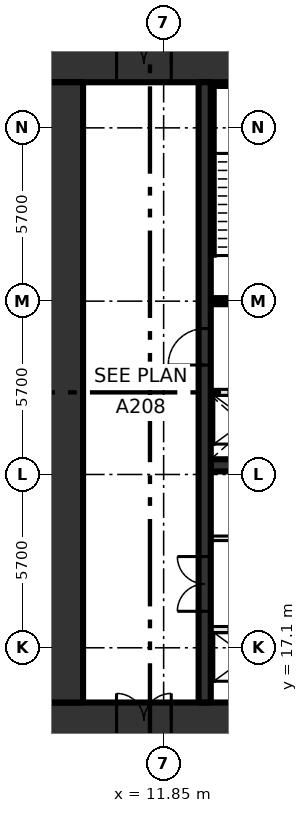
"""IFC4 building model, lengths in metres.
Left out: names, types, materials, properties, quantities, classifications, styles, units other than length and angle.
Written with IfcOpenShell. Run it as: python <this file> out.ifc"""

import sys

from ifc_helpers import new_model, si_unit, direction, frame, frame_2d, origin, place, context, subcontext, project, spatial, rectangle, extrude, element, fill, save


model = new_model("IFC4")
c1 = context("Model", 3, precision=1e-05, world=origin(), true_north=direction((0.0, 1.0)))
c2 = subcontext(c1, "Body", "Model", "MODEL_VIEW")
j1 = project(units=[si_unit("LENGTHUNIT", "METRE"), si_unit("PLANEANGLEUNIT", "RADIAN")], contexts=[c1])
p1 = place(None, origin())
s1 = spatial("IfcSite", under=j1, at=p1, CompositionType="ELEMENT")
p2 = place(p1, origin())
s2 = spatial("IfcBuilding", under=s1, at=p2, CompositionType="ELEMENT")
p3 = place(p2, frame((0.0, 0.0, 28.2)))
s3 = spatial("IfcBuildingStorey", under=s2, at=p3, CompositionType="ELEMENT", Elevation=28.2)
p4 = place(p3, frame((8.0, 14.7, -0.45), z_axis=(0.0, 0.0, 1.0), x_axis=(1.0, 0.0, 0.0)))
e1 = element("IfcWall", 1, at=p4, inside=s3, PredefinedType="SHEAR", context=c2, shape_type="SweptSolid", body=[
    extrude(rectangle(XDim=22.8, YDim=1.2, at=frame_2d((11.4, 0.0))), origin(), (0.0, 0.0, 1.0), 4.8),
])
p5 = place(p4, frame((2.3, 0.0, 0.45)))
e2 = element("IfcOpeningElement", 2, at=p5, cuts=e1, PredefinedType="OPENING", context=c2, shape_type="SweptSolid", body=[
    extrude(rectangle(XDim=1.8, YDim=2.1, at=frame_2d((0.9, 1.05))), frame((0.0, 0.61, 0.0), z_axis=(0.0, -1.0, 0.0), x_axis=(1.0, 0.0, 0.0)), (0.0, 0.0, 1.0), 1.22),
])
p6 = place(p3, frame((8.0, 36.3, -0.45), z_axis=(0.0, 0.0, 1.0), x_axis=(1.0, 0.0, 0.0)))
e3 = element("IfcWall", 3, at=p6, inside=s3, PredefinedType="SHEAR", context=c2, shape_type="SweptSolid", body=[
    extrude(rectangle(XDim=22.8, YDim=1.2, at=frame_2d((11.4, 0.0))), origin(), (0.0, 0.0, 1.0), 4.8),
])
p7 = place(p6, frame((2.3, 0.0, 0.45)))
e4 = element("IfcOpeningElement", 4, at=p7, cuts=e3, PredefinedType="OPENING", context=c2, shape_type="SweptSolid", body=[
    extrude(rectangle(XDim=1.8, YDim=2.1, at=frame_2d((0.9, 1.05))), frame((0.0, 0.61, 0.0), z_axis=(0.0, -1.0, 0.0), x_axis=(1.0, 0.0, 0.0)), (0.0, 0.0, 1.0), 1.22),
])
p8 = place(p3, frame((8.6, 15.3, -0.45), z_axis=(0.0, 0.0, 1.0), x_axis=(0.0, 1.0, 0.0)))
e5 = element("IfcWall", 5, at=p8, inside=s3, PredefinedType="SHEAR", context=c2, shape_type="SweptSolid", body=[
    extrude(rectangle(XDim=20.4, YDim=1.2, at=frame_2d((10.2, 0.0))), origin(), (0.0, 0.0, 1.0), 4.8),
])
p9 = place(p3, frame((13.4, 17.7, 0.0), z_axis=(0.0, 0.0, 1.0), x_axis=(1.0, 0.0, 0.0)))
e6 = element("IfcWall", 6, at=p9, inside=s3, PredefinedType="SOLIDWALL", context=c2, shape_type="SweptSolid", body=[
    extrude(rectangle(XDim=13.4, YDim=0.2, at=frame_2d((6.7, 0.0))), origin(), (0.0, 0.0, 1.0), 4.35),
])
p10 = place(p9, frame((0.6, 0.0, 0.0)))
e7 = element("IfcOpeningElement", 7, at=p10, cuts=e6, PredefinedType="OPENING", context=c2, shape_type="SweptSolid", body=[
    extrude(rectangle(XDim=1.1, YDim=2.1, at=frame_2d((0.55, 1.05))), frame((0.0, 0.11, 0.0), z_axis=(0.0, -1.0, 0.0), x_axis=(1.0, 0.0, 0.0)), (0.0, 0.0, 1.0), 0.22),
])
p11 = place(p9, frame((3.3, 0.0, 0.0)))
e8 = element("IfcOpeningElement", 8, at=p11, cuts=e6, PredefinedType="OPENING", context=c2, shape_type="SweptSolid", body=[
    extrude(rectangle(XDim=1.1, YDim=2.1, at=frame_2d((0.55, 1.05))), frame((0.0, 0.11, 0.0), z_axis=(0.0, -1.0, 0.0), x_axis=(1.0, 0.0, 0.0)), (0.0, 0.0, 1.0), 0.22),
])
p12 = place(p9, frame((6.0, 0.0, 0.0)))
e9 = element("IfcOpeningElement", 9, at=p12, cuts=e6, PredefinedType="OPENING", context=c2, shape_type="SweptSolid", body=[
    extrude(rectangle(XDim=1.1, YDim=2.1, at=frame_2d((0.55, 1.05))), frame((0.0, 0.11, 0.0), z_axis=(0.0, -1.0, 0.0), x_axis=(1.0, 0.0, 0.0)), (0.0, 0.0, 1.0), 0.22),
])
p13 = place(p9, frame((8.7, 0.0, 0.0)))
e10 = element("IfcOpeningElement", 10, at=p13, cuts=e6, PredefinedType="OPENING", context=c2, shape_type="SweptSolid", body=[
    extrude(rectangle(XDim=1.1, YDim=2.1, at=frame_2d((0.55, 1.05))), frame((0.0, 0.11, 0.0), z_axis=(0.0, -1.0, 0.0), x_axis=(1.0, 0.0, 0.0)), (0.0, 0.0, 1.0), 0.22),
])
p14 = place(p9, frame((11.4, 0.0, 0.0)))
e11 = element("IfcOpeningElement", 11, at=p14, cuts=e6, PredefinedType="OPENING", context=c2, shape_type="SweptSolid", body=[
    extrude(rectangle(XDim=1.1, YDim=2.1, at=frame_2d((0.55, 1.05))), frame((0.0, 0.11, 0.0), z_axis=(0.0, -1.0, 0.0), x_axis=(1.0, 0.0, 0.0)), (0.0, 0.0, 1.0), 0.22),
])
p15 = place(p3, frame((13.4, 20.7, 0.0), z_axis=(0.0, 0.0, 1.0), x_axis=(1.0, 0.0, 0.0)))
e12 = element("IfcWall", 12, at=p15, inside=s3, PredefinedType="PARTITIONING", context=c2, shape_type="SweptSolid", body=[
    extrude(rectangle(XDim=13.4, YDim=0.15, at=frame_2d((6.7, 0.0))), origin(), (0.0, 0.0, 1.0), 4.35),
])
p16 = place(p15, frame((4.75, 0.0, 0.0)))
e13 = element("IfcOpeningElement", 13, at=p16, cuts=e12, PredefinedType="OPENING", context=c2, shape_type="SweptSolid", body=[
    extrude(rectangle(XDim=0.9, YDim=2.1, at=frame_2d((0.45, 1.05))), frame((0.0, 0.085, 0.0), z_axis=(0.0, -1.0, 0.0), x_axis=(1.0, 0.0, 0.0)), (0.0, 0.0, 1.0), 0.17),
])
p17 = place(p15, frame((11.5, 0.0, 0.0)))
e14 = element("IfcOpeningElement", 14, at=p17, cuts=e12, PredefinedType="OPENING", context=c2, shape_type="SweptSolid", body=[
    extrude(rectangle(XDim=0.9, YDim=2.1, at=frame_2d((0.45, 1.05))), frame((0.0, 0.085, 0.0), z_axis=(0.0, -1.0, 0.0), x_axis=(1.0, 0.0, 0.0)), (0.0, 0.0, 1.0), 0.17),
])
p18 = place(p3, frame((13.4, 23.1, 0.0), z_axis=(0.0, 0.0, 1.0), x_axis=(1.0, 0.0, 0.0)))
e15 = element("IfcWall", 15, at=p18, inside=s3, PredefinedType="SHEAR", context=c2, shape_type="SweptSolid", body=[
    extrude(rectangle(XDim=16.2, YDim=0.4, at=frame_2d((8.1, 0.0))), origin(), (0.0, 0.0, 1.0), 4.35),
])
p19 = place(p3, frame((13.4, 25.5, 0.0), z_axis=(0.0, 0.0, 1.0), x_axis=(1.0, 0.0, 0.0)))
e16 = element("IfcWall", 16, at=p19, inside=s3, PredefinedType="SOLIDWALL", context=c2, shape_type="SweptSolid", body=[
    extrude(rectangle(XDim=16.2, YDim=0.2, at=frame_2d((8.1, 0.0))), origin(), (0.0, 0.0, 1.0), 4.35),
])
p20 = place(p19, frame((0.6, 0.0, 0.0)))
e17 = element("IfcOpeningElement", 17, at=p20, cuts=e16, PredefinedType="OPENING", context=c2, shape_type="SweptSolid", body=[
    extrude(rectangle(XDim=1.1, YDim=2.1, at=frame_2d((0.55, 1.05))), frame((0.0, 0.11, 0.0), z_axis=(0.0, -1.0, 0.0), x_axis=(1.0, 0.0, 0.0)), (0.0, 0.0, 1.0), 0.22),
])
p21 = place(p19, frame((3.3, 0.0, 0.0)))
e18 = element("IfcOpeningElement", 18, at=p21, cuts=e16, PredefinedType="OPENING", context=c2, shape_type="SweptSolid", body=[
    extrude(rectangle(XDim=1.1, YDim=2.1, at=frame_2d((0.55, 1.05))), frame((0.0, 0.11, 0.0), z_axis=(0.0, -1.0, 0.0), x_axis=(1.0, 0.0, 0.0)), (0.0, 0.0, 1.0), 0.22),
])
p22 = place(p19, frame((6.0, 0.0, 0.0)))
e19 = element("IfcOpeningElement", 19, at=p22, cuts=e16, PredefinedType="OPENING", context=c2, shape_type="SweptSolid", body=[
    extrude(rectangle(XDim=1.1, YDim=2.1, at=frame_2d((0.55, 1.05))), frame((0.0, 0.11, 0.0), z_axis=(0.0, -1.0, 0.0), x_axis=(1.0, 0.0, 0.0)), (0.0, 0.0, 1.0), 0.22),
])
p23 = place(p19, frame((8.7, 0.0, 0.0)))
e20 = element("IfcOpeningElement", 20, at=p23, cuts=e16, PredefinedType="OPENING", context=c2, shape_type="SweptSolid", body=[
    extrude(rectangle(XDim=1.1, YDim=2.1, at=frame_2d((0.55, 1.05))), frame((0.0, 0.11, 0.0), z_axis=(0.0, -1.0, 0.0), x_axis=(1.0, 0.0, 0.0)), (0.0, 0.0, 1.0), 0.22),
])
p24 = place(p3, frame((13.4, 28.5, 0.0), z_axis=(0.0, 0.0, 1.0), x_axis=(1.0, 0.0, 0.0)))
e21 = element("IfcWall", 21, at=p24, inside=s3, PredefinedType="SOLIDWALL", context=c2, shape_type="SweptSolid", body=[
    extrude(rectangle(XDim=6.7, YDim=0.2, at=frame_2d((3.35, 0.0))), origin(), (0.0, 0.0, 1.0), 4.35),
])
p25 = place(p24, frame((0.9, 0.0, 0.0)))
e22 = element("IfcOpeningElement", 22, at=p25, cuts=e21, PredefinedType="OPENING", context=c2, shape_type="SweptSolid", body=[
    extrude(rectangle(XDim=1.2, YDim=2.1, at=frame_2d((0.6, 1.05))), frame((0.0, 0.11, 0.0), z_axis=(0.0, -1.0, 0.0), x_axis=(1.0, 0.0, 0.0)), (0.0, 0.0, 1.0), 0.22),
])
p26 = place(p24, frame((3.7, 0.0, 0.0)))
e23 = element("IfcOpeningElement", 23, at=p26, cuts=e21, PredefinedType="OPENING", context=c2, shape_type="SweptSolid", body=[
    extrude(rectangle(XDim=1.1, YDim=2.1, at=frame_2d((0.55, 1.05))), frame((0.0, 0.11, 0.0), z_axis=(0.0, -1.0, 0.0), x_axis=(1.0, 0.0, 0.0)), (0.0, 0.0, 1.0), 0.22),
])
p27 = place(p3, frame((13.2, 15.3, 0.0), z_axis=(0.0, 0.0, 1.0), x_axis=(0.0, 1.0, 0.0)))
e24 = element("IfcWall", 24, at=p27, inside=s3, PredefinedType="SHEAR", context=c2, shape_type="SweptSolid", body=[
    extrude(rectangle(XDim=20.4, YDim=0.4, at=frame_2d((10.2, 0.0))), origin(), (0.0, 0.0, 1.0), 4.35),
])
p28 = place(p27, frame((3.0, 0.0, 0.0)))
e25 = element("IfcOpeningElement", 25, at=p28, cuts=e24, PredefinedType="OPENING", context=c2, shape_type="SweptSolid", body=[
    extrude(rectangle(XDim=1.8, YDim=2.1, at=frame_2d((0.9, 1.05))), frame((0.0, 0.21, 0.0), z_axis=(0.0, -1.0, 0.0), x_axis=(1.0, 0.0, 0.0)), (0.0, 0.0, 1.0), 0.42),
])
p29 = place(p27, frame((11.1, 0.0, 0.0)))
e26 = element("IfcOpeningElement", 26, at=p29, cuts=e24, PredefinedType="OPENING", context=c2, shape_type="SweptSolid", body=[
    extrude(rectangle(XDim=1.2, YDim=2.1, at=frame_2d((0.6, 1.05))), frame((0.0, 0.21, 0.0), z_axis=(0.0, -1.0, 0.0), x_axis=(1.0, 0.0, 0.0)), (0.0, 0.0, 1.0), 0.42),
])
p30 = place(p28, origin())
e27 = element("IfcDoor", 27, at=p30, inside=s3, OperationType="DOUBLE_DOOR_SINGLE_SWING", PredefinedType="DOOR", context=c2, shape_type="SweptSolid", body=[
    extrude(rectangle(XDim=1.8, YDim=2.1, at=frame_2d((0.9, 1.05))), frame((0.0, 0.025, 0.0), z_axis=(0.0, -1.0, 0.0), x_axis=(1.0, 0.0, 0.0)), (0.0, 0.0, 1.0), 0.05),
])
fill(e25, e27)
p31 = place(p29, origin())
e28 = element("IfcDoor", 28, at=p31, inside=s3, OperationType="SINGLE_SWING_LEFT", PredefinedType="DOOR", context=c2, shape_type="SweptSolid", body=[
    extrude(rectangle(XDim=1.2, YDim=2.1, at=frame_2d((0.6, 1.05))), frame((0.0, 0.025, 0.0), z_axis=(0.0, -1.0, 0.0), x_axis=(1.0, 0.0, 0.0)), (0.0, 0.0, 1.0), 0.05),
])
fill(e26, e28)
p32 = place(p7, origin())
e29 = element("IfcDoor", 29, at=p32, inside=s3, OperationType="DOUBLE_DOOR_SINGLE_SWING", PredefinedType="DOOR", context=c2, shape_type="SweptSolid", body=[
    extrude(rectangle(XDim=1.8, YDim=2.1, at=frame_2d((0.9, 1.05))), frame((0.0, 0.025, 0.0), z_axis=(0.0, -1.0, 0.0), x_axis=(1.0, 0.0, 0.0)), (0.0, 0.0, 1.0), 0.05),
])
fill(e4, e29)
p33 = place(p5, origin())
e30 = element("IfcDoor", 30, at=p33, inside=s3, OperationType="DOUBLE_DOOR_SINGLE_SWING", PredefinedType="DOOR", context=c2, shape_type="SweptSolid", body=[
    extrude(rectangle(XDim=1.8, YDim=2.1, at=frame_2d((0.9, 1.05))), frame((0.0, 0.025, 0.0), z_axis=(0.0, -1.0, 0.0), x_axis=(1.0, 0.0, 0.0)), (0.0, 0.0, 1.0), 0.05),
])
fill(e2, e30)
save(model, sys.argv[1])
